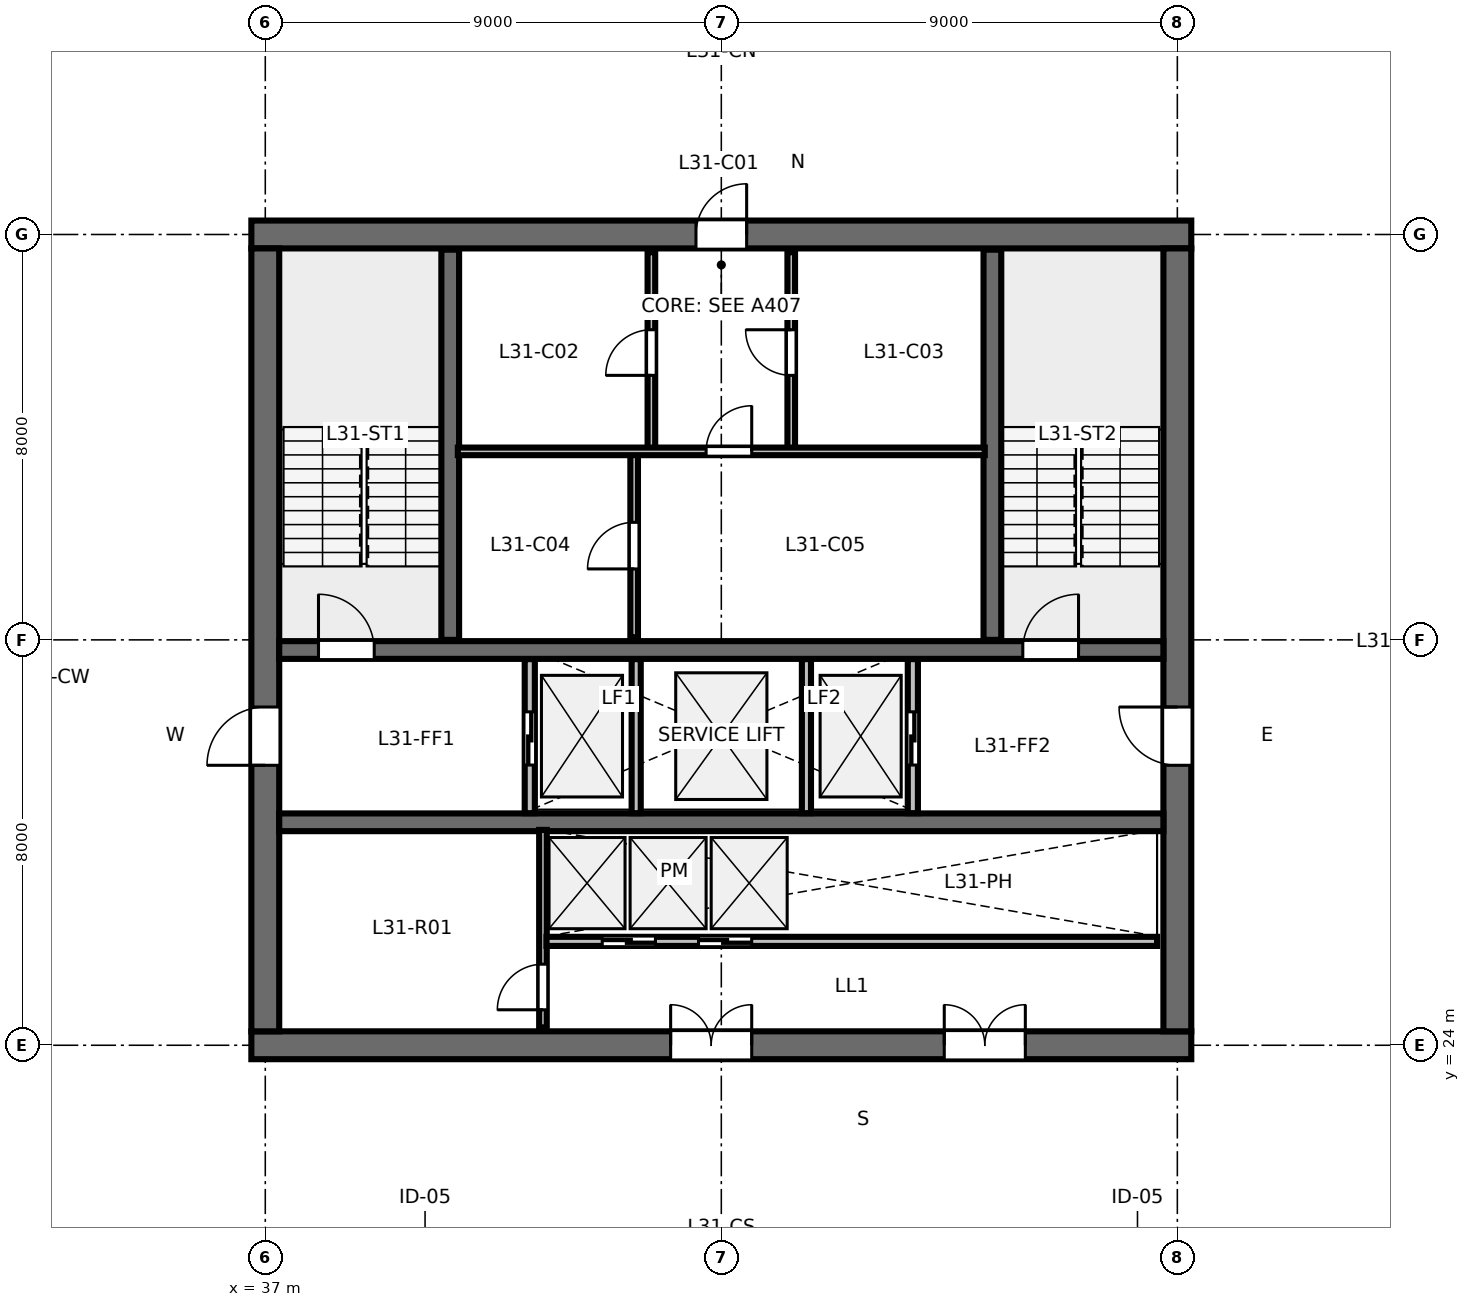
"""IFC4 building model, lengths in metres.
Left out: names, types, materials, properties, quantities, classifications, styles, units other than length and angle.
Written with IfcOpenShell. Run it as: python <this file> out.ifc"""

import sys

from ifc_helpers import new_model, si_unit, direction, frame, frame_2d, origin, place, context, subcontext, project, spatial, rectangle, extrude, element, fill, save


model = new_model("IFC4")
c1 = context("Model", 3, precision=1e-05, world=origin(), true_north=direction((0.0, 1.0)))
c2 = subcontext(c1, "Body", "Model", "MODEL_VIEW")
j1 = project(units=[si_unit("LENGTHUNIT", "METRE"), si_unit("PLANEANGLEUNIT", "RADIAN")], contexts=[c1])
p1 = place(None, origin())
s1 = spatial("IfcSite", under=j1, at=p1, CompositionType="ELEMENT")
p2 = place(p1, origin())
s2 = spatial("IfcBuilding", under=s1, at=p2, CompositionType="ELEMENT")
p3 = place(p2, frame((0.0, 0.0, 120.4)))
s3 = spatial("IfcBuildingStorey", under=s2, at=p3, CompositionType="ELEMENT", Elevation=120.4)
p4 = place(p3, frame((36.725, 24.0, 0.0), z_axis=(0.0, 0.0, 1.0), x_axis=(1.0, 0.0, 0.0)))
e1 = element("IfcWall", 1, at=p4, inside=s3, PredefinedType="SHEAR", context=c2, shape_type="SweptSolid", body=[
    extrude(rectangle(XDim=18.55, YDim=0.55, at=frame_2d((9.275, 0.0))), origin(), (0.0, 0.0, 1.0), 3.36),
])
p5 = place(p4, frame((8.275, 0.0, 0.0)))
e2 = element("IfcOpeningElement", 2, at=p5, cuts=e1, PredefinedType="OPENING", context=c2, shape_type="SweptSolid", body=[
    extrude(rectangle(XDim=1.6, YDim=2.15, at=frame_2d((0.8, 1.075))), frame((0.0, 0.285, 0.0), z_axis=(0.0, -1.0, 0.0), x_axis=(1.0, 0.0, 0.0)), (0.0, 0.0, 1.0), 0.57),
])
p6 = place(p4, frame((13.675, 0.0, 0.0)))
e3 = element("IfcOpeningElement", 3, at=p6, cuts=e1, PredefinedType="OPENING", context=c2, shape_type="SweptSolid", body=[
    extrude(rectangle(XDim=1.6, YDim=2.15, at=frame_2d((0.8, 1.075))), frame((0.0, 0.285, 0.0), z_axis=(0.0, -1.0, 0.0), x_axis=(1.0, 0.0, 0.0)), (0.0, 0.0, 1.0), 0.57),
])
p7 = place(p3, frame((36.725, 40.0, 0.0), z_axis=(0.0, 0.0, 1.0), x_axis=(1.0, 0.0, 0.0)))
e4 = element("IfcWall", 4, at=p7, inside=s3, PredefinedType="SHEAR", context=c2, shape_type="SweptSolid", body=[
    extrude(rectangle(XDim=18.55, YDim=0.55, at=frame_2d((9.275, 0.0))), origin(), (0.0, 0.0, 1.0), 3.36),
])
p8 = place(p7, frame((8.775, 0.0, 0.0)))
e5 = element("IfcOpeningElement", 5, at=p8, cuts=e4, PredefinedType="OPENING", context=c2, shape_type="SweptSolid", body=[
    extrude(rectangle(XDim=1.0, YDim=2.15, at=frame_2d((0.5, 1.075))), frame((0.0, 0.285, 0.0), z_axis=(0.0, -1.0, 0.0), x_axis=(1.0, 0.0, 0.0)), (0.0, 0.0, 1.0), 0.57),
])
p9 = place(p3, frame((37.0, 24.275, 0.0), z_axis=(0.0, 0.0, 1.0), x_axis=(0.0, 1.0, 0.0)))
e6 = element("IfcWall", 6, at=p9, inside=s3, PredefinedType="SHEAR", context=c2, shape_type="SweptSolid", body=[
    extrude(rectangle(XDim=15.45, YDim=0.55, at=frame_2d((7.725, 0.0))), origin(), (0.0, 0.0, 1.0), 3.36),
])
p10 = place(p9, frame((5.25, 0.0, 0.0)))
e7 = element("IfcOpeningElement", 7, at=p10, cuts=e6, PredefinedType="OPENING", context=c2, shape_type="SweptSolid", body=[
    extrude(rectangle(XDim=1.15, YDim=2.15, at=frame_2d((0.575, 1.075))), frame((0.0, 0.285, 0.0), z_axis=(0.0, -1.0, 0.0), x_axis=(1.0, 0.0, 0.0)), (0.0, 0.0, 1.0), 0.57),
])
p11 = place(p3, frame((55.0, 24.275, 0.0), z_axis=(0.0, 0.0, 1.0), x_axis=(0.0, 1.0, 0.0)))
e8 = element("IfcWall", 8, at=p11, inside=s3, PredefinedType="SHEAR", context=c2, shape_type="SweptSolid", body=[
    extrude(rectangle(XDim=15.45, YDim=0.55, at=frame_2d((7.725, 0.0))), origin(), (0.0, 0.0, 1.0), 3.36),
])
p12 = place(p11, frame((5.25, 0.0, 0.0)))
e9 = element("IfcOpeningElement", 9, at=p12, cuts=e8, PredefinedType="OPENING", context=c2, shape_type="SweptSolid", body=[
    extrude(rectangle(XDim=1.15, YDim=2.15, at=frame_2d((0.575, 1.075))), frame((0.0, 0.285, 0.0), z_axis=(0.0, -1.0, 0.0), x_axis=(1.0, 0.0, 0.0)), (0.0, 0.0, 1.0), 0.57),
])
p13 = place(p3, frame((37.275, 31.8, 0.0), z_axis=(0.0, 0.0, 1.0), x_axis=(1.0, 0.0, 0.0)))
e10 = element("IfcWall", 10, at=p13, inside=s3, PredefinedType="SHEAR", context=c2, shape_type="SweptSolid", body=[
    extrude(rectangle(XDim=17.45, YDim=0.35, at=frame_2d((8.725, 0.0))), origin(), (0.0, 0.0, 1.0), 3.36),
])
p14 = place(p13, frame((0.775, 0.0, 0.0)))
e11 = element("IfcOpeningElement", 11, at=p14, cuts=e10, PredefinedType="OPENING", context=c2, shape_type="SweptSolid", body=[
    extrude(rectangle(XDim=1.1, YDim=2.15, at=frame_2d((0.55, 1.075))), frame((0.0, 0.185, 0.0), z_axis=(0.0, -1.0, 0.0), x_axis=(1.0, 0.0, 0.0)), (0.0, 0.0, 1.0), 0.37),
])
p15 = place(p13, frame((14.675, 0.0, 0.0)))
e12 = element("IfcOpeningElement", 12, at=p15, cuts=e10, PredefinedType="OPENING", context=c2, shape_type="SweptSolid", body=[
    extrude(rectangle(XDim=1.1, YDim=2.15, at=frame_2d((0.55, 1.075))), frame((0.0, 0.185, 0.0), z_axis=(0.0, -1.0, 0.0), x_axis=(1.0, 0.0, 0.0)), (0.0, 0.0, 1.0), 0.37),
])
p16 = place(p3, frame((37.275, 28.4, 0.0), z_axis=(0.0, 0.0, 1.0), x_axis=(1.0, 0.0, 0.0)))
e13 = element("IfcWall", 13, at=p16, inside=s3, PredefinedType="SHEAR", context=c2, shape_type="SweptSolid", body=[
    extrude(rectangle(XDim=17.45, YDim=0.35, at=frame_2d((8.725, 0.0))), origin(), (0.0, 0.0, 1.0), 3.36),
])
for number, where, z_axis, x_axis in (
    (14, (40.65, 32.0, 0.0), (0.0, 0.0, 1.0), (0.0, 1.0, 0.0)),
    (15, (51.35, 32.0, 0.0), (0.0, 0.0, 1.0), (0.0, 1.0, 0.0)),
):
    element("IfcWall", number, at=place(p3, frame(where, z_axis=z_axis, x_axis=x_axis)), inside=s3, PredefinedType="SHEAR", context=c2, shape_type="SweptSolid", body=[
        extrude(rectangle(XDim=7.7, YDim=0.35, at=frame_2d((3.85, 0.0))), origin(), (0.0, 0.0, 1.0), 3.6),
    ])
p17 = place(p3, frame((44.62, 35.72, 0.0), z_axis=(0.0, 0.0, 1.0), x_axis=(0.0, 1.0, 0.0)))
e16 = element("IfcWall", 16, at=p17, inside=s3, PredefinedType="PARTITIONING", context=c2, shape_type="SweptSolid", body=[
    extrude(rectangle(XDim=3.93, YDim=0.15, at=frame_2d((1.965, 0.0))), origin(), (0.0, 0.0, 1.0), 3.36),
])
p18 = place(p17, frame((1.5, 0.0, 0.0)))
e17 = element("IfcOpeningElement", 17, at=p18, cuts=e16, PredefinedType="OPENING", context=c2, shape_type="SweptSolid", body=[
    extrude(rectangle(XDim=0.9, YDim=2.15, at=frame_2d((0.45, 1.075))), frame((0.0, 0.085, 0.0), z_axis=(0.0, -1.0, 0.0), x_axis=(1.0, 0.0, 0.0)), (0.0, 0.0, 1.0), 0.17),
])
p19 = place(p3, frame((47.38, 35.72, 0.0), z_axis=(0.0, 0.0, 1.0), x_axis=(0.0, 1.0, 0.0)))
e18 = element("IfcWall", 18, at=p19, inside=s3, PredefinedType="PARTITIONING", context=c2, shape_type="SweptSolid", body=[
    extrude(rectangle(XDim=3.93, YDim=0.15, at=frame_2d((1.965, 0.0))), origin(), (0.0, 0.0, 1.0), 3.36),
])
p20 = place(p19, frame((1.5, 0.0, 0.0)))
e19 = element("IfcOpeningElement", 19, at=p20, cuts=e18, PredefinedType="OPENING", context=c2, shape_type="SweptSolid", body=[
    extrude(rectangle(XDim=0.9, YDim=2.15, at=frame_2d((0.45, 1.075))), frame((0.0, 0.085, 0.0), z_axis=(0.0, -1.0, 0.0), x_axis=(1.0, 0.0, 0.0)), (0.0, 0.0, 1.0), 0.17),
])
p21 = place(p3, frame((44.28, 32.05, 0.0), z_axis=(0.0, 0.0, 1.0), x_axis=(0.0, 1.0, 0.0)))
e20 = element("IfcWall", 20, at=p21, inside=s3, PredefinedType="PARTITIONING", context=c2, shape_type="SweptSolid", body=[
    extrude(rectangle(XDim=3.67, YDim=0.15, at=frame_2d((1.835, 0.0))), origin(), (0.0, 0.0, 1.0), 3.36),
])
p22 = place(p21, frame((1.35, 0.0, 0.0)))
e21 = element("IfcOpeningElement", 21, at=p22, cuts=e20, PredefinedType="OPENING", context=c2, shape_type="SweptSolid", body=[
    extrude(rectangle(XDim=0.92, YDim=2.15, at=frame_2d((0.46, 1.075))), frame((0.0, 0.085, 0.0), z_axis=(0.0, -1.0, 0.0), x_axis=(1.0, 0.0, 0.0)), (0.0, 0.0, 1.0), 0.17),
])
p23 = place(p3, frame((40.8, 35.72, 0.0), z_axis=(0.0, 0.0, 1.0), x_axis=(1.0, 0.0, 0.0)))
e22 = element("IfcWall", 22, at=p23, inside=s3, PredefinedType="PARTITIONING", context=c2, shape_type="SweptSolid", body=[
    extrude(rectangle(XDim=10.4, YDim=0.15, at=frame_2d((5.2, 0.0))), origin(), (0.0, 0.0, 1.0), 3.36),
])
p24 = place(p23, frame((4.9, 0.0, 0.0)))
e23 = element("IfcOpeningElement", 23, at=p24, cuts=e22, PredefinedType="OPENING", context=c2, shape_type="SweptSolid", body=[
    extrude(rectangle(XDim=0.9, YDim=2.15, at=frame_2d((0.45, 1.075))), frame((0.0, 0.085, 0.0), z_axis=(0.0, -1.0, 0.0), x_axis=(1.0, 0.0, 0.0)), (0.0, 0.0, 1.0), 0.17),
])
p25 = place(p3, frame((42.22, 28.58, 0.0), z_axis=(0.0, 0.0, 1.0), x_axis=(0.0, 1.0, 0.0)))
e24 = element("IfcWall", 24, at=p25, inside=s3, PredefinedType="PARTITIONING", context=c2, shape_type="SweptSolid", body=[
    extrude(rectangle(XDim=3.04, YDim=0.2, at=frame_2d((1.52, 0.0))), origin(), (0.0, 0.0, 1.0), 3.36),
])
p26 = place(p25, frame((0.95, 0.0, 0.0)))
e25 = element("IfcOpeningElement", 25, at=p26, cuts=e24, PredefinedType="OPENING", context=c2, shape_type="SweptSolid", body=[
    extrude(rectangle(XDim=1.05, YDim=2.15, at=frame_2d((0.525, 1.075))), frame((0.0, 0.11, 0.0), z_axis=(0.0, -1.0, 0.0), x_axis=(1.0, 0.0, 0.0)), (0.0, 0.0, 1.0), 0.22),
])
p27 = place(p3, frame((49.78, 28.58, 0.0), z_axis=(0.0, 0.0, 1.0), x_axis=(0.0, 1.0, 0.0)))
e26 = element("IfcWall", 26, at=p27, inside=s3, PredefinedType="PARTITIONING", context=c2, shape_type="SweptSolid", body=[
    extrude(rectangle(XDim=3.04, YDim=0.2, at=frame_2d((1.52, 0.0))), origin(), (0.0, 0.0, 1.0), 3.36),
])
p28 = place(p27, frame((0.95, 0.0, 0.0)))
e27 = element("IfcOpeningElement", 27, at=p28, cuts=e26, PredefinedType="OPENING", context=c2, shape_type="SweptSolid", body=[
    extrude(rectangle(XDim=1.05, YDim=2.15, at=frame_2d((0.525, 1.075))), frame((0.0, 0.11, 0.0), z_axis=(0.0, -1.0, 0.0), x_axis=(1.0, 0.0, 0.0)), (0.0, 0.0, 1.0), 0.22),
])
for number, where, z_axis, x_axis in (
    (28, (44.32, 28.58, 0.0), (0.0, 0.0, 1.0), (0.0, 1.0, 0.0)),
    (29, (47.68, 28.58, 0.0), (0.0, 0.0, 1.0), (0.0, 1.0, 0.0)),
):
    element("IfcWall", number, at=place(p3, frame(where, z_axis=z_axis, x_axis=x_axis)), inside=s3, PredefinedType="PARTITIONING", context=c2, shape_type="SweptSolid", body=[
        extrude(rectangle(XDim=3.04, YDim=0.18, at=frame_2d((1.52, 0.0))), origin(), (0.0, 0.0, 1.0), 3.36),
    ])
p29 = place(p3, frame((42.48, 24.35, 0.0), z_axis=(0.0, 0.0, 1.0), x_axis=(0.0, 1.0, 0.0)))
e30 = element("IfcWall", 30, at=p29, inside=s3, PredefinedType="PARTITIONING", context=c2, shape_type="SweptSolid", body=[
    extrude(rectangle(XDim=3.9, YDim=0.15, at=frame_2d((1.95, 0.0))), origin(), (0.0, 0.0, 1.0), 3.36),
])
p30 = place(p29, frame((0.35, 0.0, 0.0)))
e31 = element("IfcOpeningElement", 31, at=p30, cuts=e30, PredefinedType="OPENING", context=c2, shape_type="SweptSolid", body=[
    extrude(rectangle(XDim=0.9, YDim=2.15, at=frame_2d((0.45, 1.075))), frame((0.0, 0.085, 0.0), z_axis=(0.0, -1.0, 0.0), x_axis=(1.0, 0.0, 0.0)), (0.0, 0.0, 1.0), 0.17),
])
p31 = place(p3, frame((42.55, 26.05, 0.0), z_axis=(0.0, 0.0, 1.0), x_axis=(1.0, 0.0, 0.0)))
e32 = element("IfcWall", 32, at=p31, inside=s3, PredefinedType="PARTITIONING", context=c2, shape_type="SweptSolid", body=[
    extrude(rectangle(XDim=12.05, YDim=0.18, at=frame_2d((6.025, 0.0))), origin(), (0.0, 0.0, 1.0), 3.36),
])
p32 = place(p31, frame((1.1, 0.0, 0.0)))
e33 = element("IfcOpeningElement", 33, at=p32, cuts=e32, PredefinedType="OPENING", context=c2, shape_type="SweptSolid", body=[
    extrude(rectangle(XDim=1.05, YDim=2.15, at=frame_2d((0.525, 1.075))), frame((0.0, 0.1, 0.0), z_axis=(0.0, -1.0, 0.0), x_axis=(1.0, 0.0, 0.0)), (0.0, 0.0, 1.0), 0.2),
])
p33 = place(p31, frame((3.0, 0.0, 0.0)))
e34 = element("IfcOpeningElement", 34, at=p33, cuts=e32, PredefinedType="OPENING", context=c2, shape_type="SweptSolid", body=[
    extrude(rectangle(XDim=1.05, YDim=2.15, at=frame_2d((0.525, 1.075))), frame((0.0, 0.1, 0.0), z_axis=(0.0, -1.0, 0.0), x_axis=(1.0, 0.0, 0.0)), (0.0, 0.0, 1.0), 0.2),
])
p34 = place(p14, origin())
e35 = element("IfcDoor", 35, at=p34, inside=s3, OperationType="SINGLE_SWING_LEFT", PredefinedType="DOOR", context=c2, shape_type="SweptSolid", body=[
    extrude(rectangle(XDim=1.1, YDim=2.15, at=frame_2d((0.55, 1.075))), frame((0.0, 0.025, 0.0), z_axis=(0.0, -1.0, 0.0), x_axis=(1.0, 0.0, 0.0)), (0.0, 0.0, 1.0), 0.05),
])
fill(e11, e35)
p35 = place(p15, origin())
e36 = element("IfcDoor", 36, at=p35, inside=s3, OperationType="SINGLE_SWING_RIGHT", PredefinedType="DOOR", context=c2, shape_type="SweptSolid", body=[
    extrude(rectangle(XDim=1.1, YDim=2.15, at=frame_2d((0.55, 1.075))), frame((0.0, 0.025, 0.0), z_axis=(0.0, -1.0, 0.0), x_axis=(1.0, 0.0, 0.0)), (0.0, 0.0, 1.0), 0.05),
])
fill(e12, e36)
p36 = place(p8, origin())
e37 = element("IfcDoor", 37, at=p36, inside=s3, OperationType="SINGLE_SWING_RIGHT", PredefinedType="DOOR", context=c2, shape_type="SweptSolid", body=[
    extrude(rectangle(XDim=1.0, YDim=2.15, at=frame_2d((0.5, 1.075))), frame((0.0, 0.025, 0.0), z_axis=(0.0, -1.0, 0.0), x_axis=(1.0, 0.0, 0.0)), (0.0, 0.0, 1.0), 0.05),
])
fill(e5, e37)
p37 = place(p10, origin())
e38 = element("IfcDoor", 38, at=p37, inside=s3, OperationType="SINGLE_SWING_LEFT", PredefinedType="DOOR", context=c2, shape_type="SweptSolid", body=[
    extrude(rectangle(XDim=1.15, YDim=2.15, at=frame_2d((0.575, 1.075))), frame((0.0, 0.025, 0.0), z_axis=(0.0, -1.0, 0.0), x_axis=(1.0, 0.0, 0.0)), (0.0, 0.0, 1.0), 0.05),
])
fill(e7, e38)
p38 = place(p12, origin())
e39 = element("IfcDoor", 39, at=p38, inside=s3, OperationType="SINGLE_SWING_RIGHT", PredefinedType="DOOR", context=c2, shape_type="SweptSolid", body=[
    extrude(rectangle(XDim=1.15, YDim=2.15, at=frame_2d((0.575, 1.075))), frame((0.0, 0.025, 0.0), z_axis=(0.0, -1.0, 0.0), x_axis=(1.0, 0.0, 0.0)), (0.0, 0.0, 1.0), 0.05),
])
fill(e9, e39)
p39 = place(p5, origin())
e40 = element("IfcDoor", 40, at=p39, inside=s3, OperationType="DOUBLE_DOOR_SINGLE_SWING", PredefinedType="DOOR", context=c2, shape_type="SweptSolid", body=[
    extrude(rectangle(XDim=1.6, YDim=2.15, at=frame_2d((0.8, 1.075))), frame((0.0, 0.025, 0.0), z_axis=(0.0, -1.0, 0.0), x_axis=(1.0, 0.0, 0.0)), (0.0, 0.0, 1.0), 0.05),
])
fill(e2, e40)
p40 = place(p6, origin())
e41 = element("IfcDoor", 41, at=p40, inside=s3, OperationType="DOUBLE_DOOR_SINGLE_SWING", PredefinedType="DOOR", context=c2, shape_type="SweptSolid", body=[
    extrude(rectangle(XDim=1.6, YDim=2.15, at=frame_2d((0.8, 1.075))), frame((0.0, 0.025, 0.0), z_axis=(0.0, -1.0, 0.0), x_axis=(1.0, 0.0, 0.0)), (0.0, 0.0, 1.0), 0.05),
])
fill(e3, e41)
p41 = place(p18, origin())
e42 = element("IfcDoor", 42, at=p41, inside=s3, OperationType="SINGLE_SWING_LEFT", PredefinedType="DOOR", context=c2, shape_type="SweptSolid", body=[
    extrude(rectangle(XDim=0.9, YDim=2.15, at=frame_2d((0.45, 1.075))), frame((0.0, 0.025, 0.0), z_axis=(0.0, -1.0, 0.0), x_axis=(1.0, 0.0, 0.0)), (0.0, 0.0, 1.0), 0.05),
])
fill(e17, e42)
p42 = place(p20, origin())
e43 = element("IfcDoor", 43, at=p42, inside=s3, OperationType="SINGLE_SWING_RIGHT", PredefinedType="DOOR", context=c2, shape_type="SweptSolid", body=[
    extrude(rectangle(XDim=0.9, YDim=2.15, at=frame_2d((0.45, 1.075))), frame((0.0, 0.025, 0.0), z_axis=(0.0, -1.0, 0.0), x_axis=(1.0, 0.0, 0.0)), (0.0, 0.0, 1.0), 0.05),
])
fill(e19, e43)
p43 = place(p22, origin())
e44 = element("IfcDoor", 44, at=p43, inside=s3, OperationType="SINGLE_SWING_LEFT", PredefinedType="DOOR", context=c2, shape_type="SweptSolid", body=[
    extrude(rectangle(XDim=0.92, YDim=2.15, at=frame_2d((0.46, 1.075))), frame((0.0, 0.025, 0.0), z_axis=(0.0, -1.0, 0.0), x_axis=(1.0, 0.0, 0.0)), (0.0, 0.0, 1.0), 0.05),
])
fill(e21, e44)
p44 = place(p24, origin())
e45 = element("IfcDoor", 45, at=p44, inside=s3, OperationType="SINGLE_SWING_RIGHT", PredefinedType="DOOR", context=c2, shape_type="SweptSolid", body=[
    extrude(rectangle(XDim=0.9, YDim=2.15, at=frame_2d((0.45, 1.075))), frame((0.0, 0.025, 0.0), z_axis=(0.0, -1.0, 0.0), x_axis=(1.0, 0.0, 0.0)), (0.0, 0.0, 1.0), 0.05),
])
fill(e23, e45)
p45 = place(p26, origin())
e46 = element("IfcDoor", 46, at=p45, inside=s3, OperationType="SLIDING_TO_LEFT", PredefinedType="DOOR", context=c2, shape_type="SweptSolid", body=[
    extrude(rectangle(XDim=1.05, YDim=2.15, at=frame_2d((0.525, 1.075))), frame((0.0, 0.025, 0.0), z_axis=(0.0, -1.0, 0.0), x_axis=(1.0, 0.0, 0.0)), (0.0, 0.0, 1.0), 0.05),
])
fill(e25, e46)
p46 = place(p28, origin())
e47 = element("IfcDoor", 47, at=p46, inside=s3, OperationType="SLIDING_TO_RIGHT", PredefinedType="DOOR", context=c2, shape_type="SweptSolid", body=[
    extrude(rectangle(XDim=1.05, YDim=2.15, at=frame_2d((0.525, 1.075))), frame((0.0, 0.025, 0.0), z_axis=(0.0, -1.0, 0.0), x_axis=(1.0, 0.0, 0.0)), (0.0, 0.0, 1.0), 0.05),
])
fill(e27, e47)
p47 = place(p30, origin())
e48 = element("IfcDoor", 48, at=p47, inside=s3, OperationType="SINGLE_SWING_LEFT", PredefinedType="DOOR", context=c2, shape_type="SweptSolid", body=[
    extrude(rectangle(XDim=0.9, YDim=2.15, at=frame_2d((0.45, 1.075))), frame((0.0, 0.025, 0.0), z_axis=(0.0, -1.0, 0.0), x_axis=(1.0, 0.0, 0.0)), (0.0, 0.0, 1.0), 0.05),
])
fill(e31, e48)
p48 = place(p32, origin())
e49 = element("IfcDoor", 49, at=p48, inside=s3, OperationType="SLIDING_TO_LEFT", PredefinedType="DOOR", context=c2, shape_type="SweptSolid", body=[
    extrude(rectangle(XDim=1.05, YDim=2.15, at=frame_2d((0.525, 1.075))), frame((0.0, 0.025, 0.0), z_axis=(0.0, -1.0, 0.0), x_axis=(1.0, 0.0, 0.0)), (0.0, 0.0, 1.0), 0.05),
])
fill(e33, e49)
p49 = place(p33, origin())
e50 = element("IfcDoor", 50, at=p49, inside=s3, OperationType="SLIDING_TO_RIGHT", PredefinedType="DOOR", context=c2, shape_type="SweptSolid", body=[
    extrude(rectangle(XDim=1.05, YDim=2.15, at=frame_2d((0.525, 1.075))), frame((0.0, 0.025, 0.0), z_axis=(0.0, -1.0, 0.0), x_axis=(1.0, 0.0, 0.0)), (0.0, 0.0, 1.0), 0.05),
])
fill(e34, e50)
save(model, sys.argv[1])
